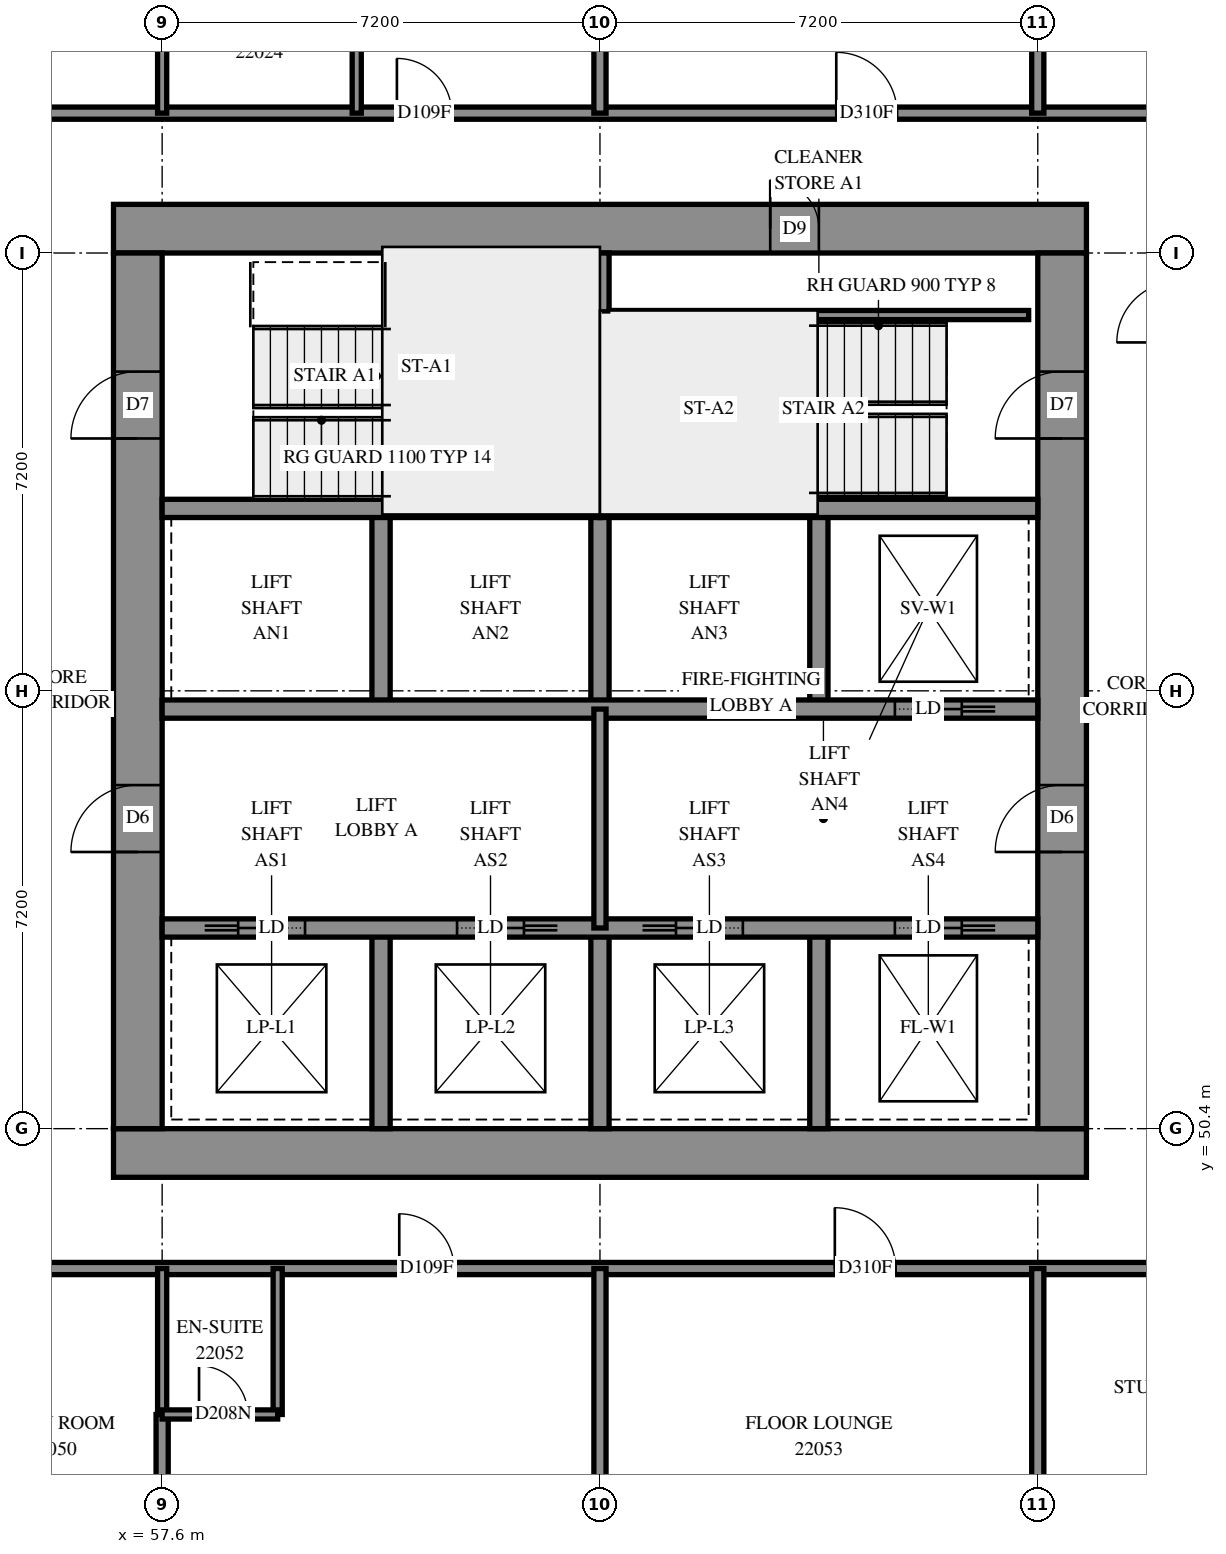
"""IFC4 building model, lengths in metres.
Left out: names, types, materials, properties, quantities, classifications, styles, units other than length and angle.
Written with IfcOpenShell. Run it as: python <this file> out.ifc"""

import sys

from ifc_helpers import new_model, si_unit, direction, frame, frame_2d, origin, place, context, subcontext, project, spatial, rectangle, extrude, element, fill, save


model = new_model("IFC4")
c1 = context("Model", 3, precision=1e-05, world=origin(), true_north=direction((0.0, 1.0)))
c2 = subcontext(c1, "Body", "Model", "MODEL_VIEW")
j1 = project(units=[si_unit("LENGTHUNIT", "METRE"), si_unit("PLANEANGLEUNIT", "RADIAN")], contexts=[c1])
p1 = place(None, origin())
s1 = spatial("IfcSite", under=j1, at=p1, CompositionType="ELEMENT")
p2 = place(p1, origin())
s2 = spatial("IfcBuilding", under=s1, at=p2, CompositionType="ELEMENT")
p3 = place(p2, frame((0.0, 0.0, 84.6)))
s3 = spatial("IfcBuildingStorey", under=s2, at=p3, CompositionType="ELEMENT", Elevation=84.6)
p4 = place(p3, frame((56.8, 50.0, -0.3), z_axis=(0.0, 0.0, 1.0), x_axis=(1.0, 0.0, 0.0)))
e1 = element("IfcWall", 1, at=p4, inside=s3, PredefinedType="SHEAR", context=c2, shape_type="SweptSolid", body=[
    extrude(rectangle(XDim=16.0, YDim=0.8, at=frame_2d((8.0, 0.0))), origin(), (0.0, 0.0, 1.0), 2.7),
])
p5 = place(p3, frame((56.8, 65.2, -0.3), z_axis=(0.0, 0.0, 1.0), x_axis=(1.0, 0.0, 0.0)))
e2 = element("IfcWall", 2, at=p5, inside=s3, PredefinedType="SHEAR", context=c2, shape_type="SweptSolid", body=[
    extrude(rectangle(XDim=16.0, YDim=0.8, at=frame_2d((8.0, 0.0))), origin(), (0.0, 0.0, 1.0), 2.7),
])
p6 = place(p5, frame((10.8, 0.0, 0.3)))
e3 = element("IfcOpeningElement", 3, at=p6, cuts=e2, PredefinedType="OPENING", context=c2, shape_type="SweptSolid", body=[
    extrude(rectangle(XDim=0.8, YDim=2.1, at=frame_2d((0.4, 1.05))), frame((0.0, 0.41, 0.0), z_axis=(0.0, -1.0, 0.0), x_axis=(1.0, 0.0, 0.0)), (0.0, 0.0, 1.0), 0.82),
])
p7 = place(p3, frame((57.2, 50.4, -0.3), z_axis=(0.0, 0.0, 1.0), x_axis=(0.0, 1.0, 0.0)))
e4 = element("IfcWall", 4, at=p7, inside=s3, PredefinedType="SHEAR", context=c2, shape_type="SweptSolid", body=[
    extrude(rectangle(XDim=14.4, YDim=0.8, at=frame_2d((7.2, 0.0))), origin(), (0.0, 0.0, 1.0), 2.7),
])
p8 = place(p7, frame((4.55, 0.0, 0.3)))
e5 = element("IfcOpeningElement", 5, at=p8, cuts=e4, PredefinedType="OPENING", context=c2, shape_type="SweptSolid", body=[
    extrude(rectangle(XDim=1.1, YDim=2.1, at=frame_2d((0.55, 1.05))), frame((0.0, 0.41, 0.0), z_axis=(0.0, -1.0, 0.0), x_axis=(1.0, 0.0, 0.0)), (0.0, 0.0, 1.0), 0.82),
])
p9 = place(p7, frame((11.35, 0.0, 0.3)))
e6 = element("IfcOpeningElement", 6, at=p9, cuts=e4, PredefinedType="OPENING", context=c2, shape_type="SweptSolid", body=[
    extrude(rectangle(XDim=1.1, YDim=2.1, at=frame_2d((0.55, 1.05))), frame((0.0, 0.41, 0.0), z_axis=(0.0, -1.0, 0.0), x_axis=(1.0, 0.0, 0.0)), (0.0, 0.0, 1.0), 0.82),
])
p10 = place(p3, frame((72.4, 50.4, -0.3), z_axis=(0.0, 0.0, 1.0), x_axis=(0.0, 1.0, 0.0)))
e7 = element("IfcWall", 7, at=p10, inside=s3, PredefinedType="SHEAR", context=c2, shape_type="SweptSolid", body=[
    extrude(rectangle(XDim=14.4, YDim=0.8, at=frame_2d((7.2, 0.0))), origin(), (0.0, 0.0, 1.0), 2.7),
])
p11 = place(p10, frame((4.55, 0.0, 0.3)))
e8 = element("IfcOpeningElement", 8, at=p11, cuts=e7, PredefinedType="OPENING", context=c2, shape_type="SweptSolid", body=[
    extrude(rectangle(XDim=1.1, YDim=2.1, at=frame_2d((0.55, 1.05))), frame((0.0, 0.41, 0.0), z_axis=(0.0, -1.0, 0.0), x_axis=(1.0, 0.0, 0.0)), (0.0, 0.0, 1.0), 0.82),
])
p12 = place(p10, frame((11.35, 0.0, 0.3)))
e9 = element("IfcOpeningElement", 9, at=p12, cuts=e7, PredefinedType="OPENING", context=c2, shape_type="SweptSolid", body=[
    extrude(rectangle(XDim=1.1, YDim=2.1, at=frame_2d((0.55, 1.05))), frame((0.0, 0.41, 0.0), z_axis=(0.0, -1.0, 0.0), x_axis=(1.0, 0.0, 0.0)), (0.0, 0.0, 1.0), 0.82),
])
for number, where, z_axis, x_axis in (
    (10, (61.2, 50.4, 0.0), (0.0, 0.0, 1.0), (0.0, 1.0, 0.0)),
    (11, (61.2, 57.3, 0.0), (0.0, 0.0, 1.0), (0.0, 1.0, 0.0)),
    (12, (64.8, 50.4, 0.0), (0.0, 0.0, 1.0), (0.0, 1.0, 0.0)),
    (13, (64.8, 57.3, 0.0), (0.0, 0.0, 1.0), (0.0, 1.0, 0.0)),
    (14, (68.4, 50.4, 0.0), (0.0, 0.0, 1.0), (0.0, 1.0, 0.0)),
    (15, (68.4, 57.3, 0.0), (0.0, 0.0, 1.0), (0.0, 1.0, 0.0)),
):
    element("IfcWall", number, at=place(p3, frame(where, z_axis=z_axis, x_axis=x_axis)), inside=s3, PredefinedType="SOLIDWALL", context=c2, shape_type="SweptSolid", body=[
        extrude(rectangle(XDim=3.3, YDim=0.3, at=frame_2d((1.65, 0.0))), origin(), (0.0, 0.0, 1.0), 3.1),
    ])
p13 = place(p3, frame((57.6, 53.7, 0.0), z_axis=(0.0, 0.0, 1.0), x_axis=(1.0, 0.0, 0.0)))
e16 = element("IfcWall", 16, at=p13, inside=s3, PredefinedType="SOLIDWALL", context=c2, shape_type="SweptSolid", body=[
    extrude(rectangle(XDim=14.4, YDim=0.3, at=frame_2d((7.2, 0.0))), origin(), (0.0, 0.0, 1.0), 3.1),
])
p14 = place(p13, frame((1.25, 0.0, 0.0)))
e17 = element("IfcOpeningElement", 17, at=p14, cuts=e16, PredefinedType="OPENING", context=c2, shape_type="SweptSolid", body=[
    extrude(rectangle(XDim=1.1, YDim=2.1, at=frame_2d((0.55, 1.05))), frame((0.0, 0.16, 0.0), z_axis=(0.0, -1.0, 0.0), x_axis=(1.0, 0.0, 0.0)), (0.0, 0.0, 1.0), 0.32),
])
p15 = place(p13, frame((4.85, 0.0, 0.0)))
e18 = element("IfcOpeningElement", 18, at=p15, cuts=e16, PredefinedType="OPENING", context=c2, shape_type="SweptSolid", body=[
    extrude(rectangle(XDim=1.1, YDim=2.1, at=frame_2d((0.55, 1.05))), frame((0.0, 0.16, 0.0), z_axis=(0.0, -1.0, 0.0), x_axis=(1.0, 0.0, 0.0)), (0.0, 0.0, 1.0), 0.32),
])
p16 = place(p13, frame((8.45, 0.0, 0.0)))
e19 = element("IfcOpeningElement", 19, at=p16, cuts=e16, PredefinedType="OPENING", context=c2, shape_type="SweptSolid", body=[
    extrude(rectangle(XDim=1.1, YDim=2.1, at=frame_2d((0.55, 1.05))), frame((0.0, 0.16, 0.0), z_axis=(0.0, -1.0, 0.0), x_axis=(1.0, 0.0, 0.0)), (0.0, 0.0, 1.0), 0.32),
])
p17 = place(p13, frame((12.05, 0.0, 0.0)))
e20 = element("IfcOpeningElement", 20, at=p17, cuts=e16, PredefinedType="OPENING", context=c2, shape_type="SweptSolid", body=[
    extrude(rectangle(XDim=1.1, YDim=2.1, at=frame_2d((0.55, 1.05))), frame((0.0, 0.16, 0.0), z_axis=(0.0, -1.0, 0.0), x_axis=(1.0, 0.0, 0.0)), (0.0, 0.0, 1.0), 0.32),
])
p18 = place(p3, frame((57.6, 57.3, 0.0), z_axis=(0.0, 0.0, 1.0), x_axis=(1.0, 0.0, 0.0)))
e21 = element("IfcWall", 21, at=p18, inside=s3, PredefinedType="SOLIDWALL", context=c2, shape_type="SweptSolid", body=[
    extrude(rectangle(XDim=14.4, YDim=0.3, at=frame_2d((7.2, 0.0))), origin(), (0.0, 0.0, 1.0), 3.1),
])
p19 = place(p18, frame((12.05, 0.0, 0.0)))
e22 = element("IfcOpeningElement", 22, at=p19, cuts=e21, PredefinedType="OPENING", context=c2, shape_type="SweptSolid", body=[
    extrude(rectangle(XDim=1.1, YDim=2.1, at=frame_2d((0.55, 1.05))), frame((0.0, 0.16, 0.0), z_axis=(0.0, -1.0, 0.0), x_axis=(1.0, 0.0, 0.0)), (0.0, 0.0, 1.0), 0.32),
])
for number, where, z_axis, x_axis in (
    (23, (57.6, 60.6, 0.0), (0.0, 0.0, 1.0), (1.0, 0.0, 0.0)),
    (24, (64.8, 60.6, 0.0), (0.0, 0.0, 1.0), (1.0, 0.0, 0.0)),
):
    element("IfcWall", number, at=place(p3, frame(where, z_axis=z_axis, x_axis=x_axis)), inside=s3, PredefinedType="SOLIDWALL", context=c2, shape_type="SweptSolid", body=[
        extrude(rectangle(XDim=7.2, YDim=0.3, at=frame_2d((3.6, 0.0))), origin(), (0.0, 0.0, 1.0), 3.1),
    ])
p20 = place(p3, frame((64.8, 60.6, 0.0), z_axis=(0.0, 0.0, 1.0), x_axis=(0.0, 1.0, 0.0)))
e25 = element("IfcWall", 25, at=p20, inside=s3, PredefinedType="SOLIDWALL", context=c2, shape_type="SweptSolid", body=[
    extrude(rectangle(XDim=4.2, YDim=0.3, at=frame_2d((2.1, 0.0))), origin(), (0.0, 0.0, 1.0), 3.1),
])
p21 = place(p3, frame((64.95, 63.78, 0.0), z_axis=(0.0, 0.0, 1.0), x_axis=(1.0, 0.0, 0.0)))
e26 = element("IfcWall", 26, at=p21, inside=s3, PredefinedType="PARTITIONING", context=c2, shape_type="SweptSolid", body=[
    extrude(rectangle(XDim=6.9, YDim=0.15, at=frame_2d((3.45, 0.0))), origin(), (0.0, 0.0, 1.0), 3.1),
])
p22 = place(p3, frame((64.8, 53.7, 0.0), z_axis=(0.0, 0.0, 1.0), x_axis=(0.0, 1.0, 0.0)))
e27 = element("IfcWall", 27, at=p22, inside=s3, PredefinedType="PARTITIONING", context=c2, shape_type="SweptSolid", body=[
    extrude(rectangle(XDim=3.6, YDim=0.2, at=frame_2d((1.8, 0.0))), origin(), (0.0, 0.0, 1.0), 3.1),
])
p23 = place(p3, frame((55.3, 48.1, 0.0), z_axis=(0.0, 0.0, 1.0), x_axis=(1.0, 0.0, 0.0)))
e28 = element("IfcWall", 28, at=p23, inside=s3, PredefinedType="PARTITIONING", context=c2, shape_type="SweptSolid", body=[
    extrude(rectangle(XDim=19.092, YDim=0.2, at=frame_2d((9.546, 0.0))), origin(), (0.0, 0.0, 1.0), 3.1),
])
p24 = place(p23, frame((6.199, 0.0, 0.0)))
e29 = element("IfcOpeningElement", 29, at=p24, cuts=e28, PredefinedType="OPENING", context=c2, shape_type="SweptSolid", body=[
    extrude(rectangle(XDim=0.9, YDim=2.1, at=frame_2d((0.45, 1.05))), frame((0.0, 0.11, 0.0), z_axis=(0.0, -1.0, 0.0), x_axis=(1.0, 0.0, 0.0)), (0.0, 0.0, 1.0), 0.22),
])
p25 = place(p23, frame((13.363, 0.0, 0.0)))
e30 = element("IfcOpeningElement", 30, at=p25, cuts=e28, PredefinedType="OPENING", context=c2, shape_type="SweptSolid", body=[
    extrude(rectangle(XDim=1.0, YDim=2.1, at=frame_2d((0.5, 1.05))), frame((0.0, 0.11, 0.0), z_axis=(0.0, -1.0, 0.0), x_axis=(1.0, 0.0, 0.0)), (0.0, 0.0, 1.0), 0.22),
])
p26 = place(p3, frame((55.3, 67.1, 0.0), z_axis=(0.0, 0.0, 1.0), x_axis=(1.0, 0.0, 0.0)))
e31 = element("IfcWall", 31, at=p26, inside=s3, PredefinedType="PARTITIONING", context=c2, shape_type="SweptSolid", body=[
    extrude(rectangle(XDim=19.0, YDim=0.2, at=frame_2d((9.5, 0.0))), origin(), (0.0, 0.0, 1.0), 3.1),
])
p27 = place(p26, frame((6.161, 0.0, 0.0)))
e32 = element("IfcOpeningElement", 32, at=p27, cuts=e31, PredefinedType="OPENING", context=c2, shape_type="SweptSolid", body=[
    extrude(rectangle(XDim=0.9, YDim=2.1, at=frame_2d((0.45, 1.05))), frame((0.0, 0.11, 0.0), z_axis=(0.0, -1.0, 0.0), x_axis=(1.0, 0.0, 0.0)), (0.0, 0.0, 1.0), 0.22),
])
p28 = place(p26, frame((13.386, 0.0, 0.0)))
e33 = element("IfcOpeningElement", 33, at=p28, cuts=e31, PredefinedType="OPENING", context=c2, shape_type="SweptSolid", body=[
    extrude(rectangle(XDim=1.0, YDim=2.1, at=frame_2d((0.5, 1.05))), frame((0.0, 0.11, 0.0), z_axis=(0.0, -1.0, 0.0), x_axis=(1.0, 0.0, 0.0)), (0.0, 0.0, 1.0), 0.22),
])
for number, where, z_axis, x_axis in (
    (34, (64.8, 67.1, 0.0), (0.0, 0.0, 1.0), (0.0, 1.0, 0.0)),
    (35, (72.0, 67.1, 0.0), (0.0, 0.0, 1.0), (0.0, 1.0, 0.0)),
    (36, (64.8, 43.7, 0.0), (0.0, 0.0, 1.0), (0.0, 1.0, 0.0)),
    (37, (72.0, 43.7, 0.0), (0.0, 0.0, 1.0), (0.0, 1.0, 0.0)),
):
    element("IfcWall", number, at=place(p3, frame(where, z_axis=z_axis, x_axis=x_axis)), inside=s3, PredefinedType="PARTITIONING", context=c2, shape_type="SweptSolid", body=[
        extrude(rectangle(XDim=4.4, YDim=0.2, at=frame_2d((2.2, 0.0))), origin(), (0.0, 0.0, 1.0), 3.1),
    ])
for number, where, z_axis, x_axis in (
    (38, (57.6, 67.1, 0.0), (0.0, 0.0, 1.0), (0.0, 1.0, 0.0)),
    (39, (60.8, 67.1, 0.0), (0.0, 0.0, 1.0), (0.0, 1.0, 0.0)),
    (40, (59.5, 45.7, 0.0), (0.0, 0.0, 1.0), (0.0, 1.0, 0.0)),
    (41, (57.6, 45.7, 0.0), (0.0, 0.0, 1.0), (0.0, 1.0, 0.0)),
):
    element("IfcWall", number, at=place(p3, frame(where, z_axis=z_axis, x_axis=x_axis)), inside=s3, PredefinedType="PARTITIONING", context=c2, shape_type="SweptSolid", body=[
        extrude(rectangle(XDim=2.4, YDim=0.15, at=frame_2d((1.2, 0.0))), origin(), (0.0, 0.0, 1.0), 3.1),
    ])
p29 = place(p3, frame((57.6, 43.7, 0.0), z_axis=(0.0, 0.0, 1.0), x_axis=(0.0, 1.0, 0.0)))
e42 = element("IfcWall", 42, at=p29, inside=s3, PredefinedType="PARTITIONING", context=c2, shape_type="SweptSolid", body=[
    extrude(rectangle(XDim=2.0, YDim=0.2, at=frame_2d((1.0, 0.0))), origin(), (0.0, 0.0, 1.0), 3.1),
])
p30 = place(p3, frame((57.6, 45.7, 0.0), z_axis=(0.0, 0.0, 1.0), x_axis=(1.0, 0.0, 0.0)))
e43 = element("IfcWall", 43, at=p30, inside=s3, PredefinedType="PARTITIONING", context=c2, shape_type="SweptSolid", body=[
    extrude(rectangle(XDim=1.9, YDim=0.15, at=frame_2d((0.95, 0.0))), origin(), (0.0, 0.0, 1.0), 3.1),
])
p31 = place(p30, frame((0.607, 0.0, 0.0)))
e44 = element("IfcOpeningElement", 44, at=p31, cuts=e43, PredefinedType="OPENING", context=c2, shape_type="SweptSolid", body=[
    extrude(rectangle(XDim=0.8, YDim=2.1, at=frame_2d((0.4, 1.05))), frame((0.0, 0.085, 0.0), z_axis=(0.0, -1.0, 0.0), x_axis=(1.0, 0.0, 0.0)), (0.0, 0.0, 1.0), 0.17),
])
p32 = place(p6, origin())
e45 = element("IfcDoor", 45, at=p32, inside=s3, OperationType="SINGLE_SWING_RIGHT", PredefinedType="DOOR", context=c2, shape_type="SweptSolid", body=[
    extrude(rectangle(XDim=0.8, YDim=2.1, at=frame_2d((0.4, 1.05))), frame((0.0, -0.34, 0.0), z_axis=(0.0, -1.0, 0.0), x_axis=(1.0, 0.0, 0.0)), (0.0, 0.0, 1.0), 0.05),
])
fill(e3, e45)
p33 = place(p8, origin())
e46 = element("IfcDoor", 46, at=p33, inside=s3, OperationType="DOUBLE_DOOR_SINGLE_SWING", PredefinedType="DOOR", context=c2, shape_type="SweptSolid", body=[
    extrude(rectangle(XDim=1.1, YDim=2.1, at=frame_2d((0.55, 1.05))), frame((0.0, 0.025, 0.0), z_axis=(0.0, -1.0, 0.0), x_axis=(1.0, 0.0, 0.0)), (0.0, 0.0, 1.0), 0.05),
])
fill(e5, e46)
p34 = place(p11, origin())
e47 = element("IfcDoor", 47, at=p34, inside=s3, OperationType="DOUBLE_DOOR_SINGLE_SWING", PredefinedType="DOOR", context=c2, shape_type="SweptSolid", body=[
    extrude(rectangle(XDim=1.1, YDim=2.1, at=frame_2d((0.55, 1.05))), frame((0.0, 0.025, 0.0), z_axis=(0.0, -1.0, 0.0), x_axis=(1.0, 0.0, 0.0)), (0.0, 0.0, 1.0), 0.05),
])
fill(e8, e47)
p35 = place(p9, origin())
e48 = element("IfcDoor", 48, at=p35, inside=s3, OperationType="SINGLE_SWING_LEFT", PredefinedType="DOOR", context=c2, shape_type="SweptSolid", body=[
    extrude(rectangle(XDim=1.1, YDim=2.1, at=frame_2d((0.55, 1.05))), frame((0.0, 0.025, 0.0), z_axis=(0.0, -1.0, 0.0), x_axis=(1.0, 0.0, 0.0)), (0.0, 0.0, 1.0), 0.05),
])
fill(e6, e48)
p36 = place(p12, origin())
e49 = element("IfcDoor", 49, at=p36, inside=s3, OperationType="SINGLE_SWING_RIGHT", PredefinedType="DOOR", context=c2, shape_type="SweptSolid", body=[
    extrude(rectangle(XDim=1.1, YDim=2.1, at=frame_2d((0.55, 1.05))), frame((0.0, 0.025, 0.0), z_axis=(0.0, -1.0, 0.0), x_axis=(1.0, 0.0, 0.0)), (0.0, 0.0, 1.0), 0.05),
])
fill(e9, e49)
p37 = place(p14, origin())
e50 = element("IfcDoor", 50, at=p37, inside=s3, OperationType="SLIDING_TO_LEFT", PredefinedType="DOOR", context=c2, shape_type="SweptSolid", body=[
    extrude(rectangle(XDim=1.1, YDim=2.1, at=frame_2d((0.55, 1.05))), frame((0.0, 0.025, 0.0), z_axis=(0.0, -1.0, 0.0), x_axis=(1.0, 0.0, 0.0)), (0.0, 0.0, 1.0), 0.05),
])
fill(e17, e50)
p38 = place(p15, origin())
e51 = element("IfcDoor", 51, at=p38, inside=s3, OperationType="SLIDING_TO_RIGHT", PredefinedType="DOOR", context=c2, shape_type="SweptSolid", body=[
    extrude(rectangle(XDim=1.1, YDim=2.1, at=frame_2d((0.55, 1.05))), frame((0.0, 0.025, 0.0), z_axis=(0.0, -1.0, 0.0), x_axis=(1.0, 0.0, 0.0)), (0.0, 0.0, 1.0), 0.05),
])
fill(e18, e51)
p39 = place(p16, origin())
e52 = element("IfcDoor", 52, at=p39, inside=s3, OperationType="SLIDING_TO_LEFT", PredefinedType="DOOR", context=c2, shape_type="SweptSolid", body=[
    extrude(rectangle(XDim=1.1, YDim=2.1, at=frame_2d((0.55, 1.05))), frame((0.0, 0.025, 0.0), z_axis=(0.0, -1.0, 0.0), x_axis=(1.0, 0.0, 0.0)), (0.0, 0.0, 1.0), 0.05),
])
fill(e19, e52)
p40 = place(p17, origin())
e53 = element("IfcDoor", 53, at=p40, inside=s3, OperationType="SLIDING_TO_RIGHT", PredefinedType="DOOR", context=c2, shape_type="SweptSolid", body=[
    extrude(rectangle(XDim=1.1, YDim=2.1, at=frame_2d((0.55, 1.05))), frame((0.0, 0.025, 0.0), z_axis=(0.0, -1.0, 0.0), x_axis=(1.0, 0.0, 0.0)), (0.0, 0.0, 1.0), 0.05),
])
fill(e20, e53)
p41 = place(p19, origin())
e54 = element("IfcDoor", 54, at=p41, inside=s3, OperationType="SLIDING_TO_RIGHT", PredefinedType="DOOR", context=c2, shape_type="SweptSolid", body=[
    extrude(rectangle(XDim=1.1, YDim=2.1, at=frame_2d((0.55, 1.05))), frame((0.0, 0.025, 0.0), z_axis=(0.0, -1.0, 0.0), x_axis=(1.0, 0.0, 0.0)), (0.0, 0.0, 1.0), 0.05),
])
fill(e22, e54)
p42 = place(p27, origin())
e55 = element("IfcDoor", 55, at=p42, inside=s3, OperationType="SINGLE_SWING_RIGHT", PredefinedType="DOOR", context=c2, shape_type="SweptSolid", body=[
    extrude(rectangle(XDim=0.9, YDim=2.1, at=frame_2d((0.45, 1.05))), frame((0.0, 0.025, 0.0), z_axis=(0.0, -1.0, 0.0), x_axis=(1.0, 0.0, 0.0)), (0.0, 0.0, 1.0), 0.05),
])
fill(e32, e55)
p43 = place(p28, origin())
e56 = element("IfcDoor", 56, at=p43, inside=s3, OperationType="SINGLE_SWING_RIGHT", PredefinedType="DOOR", context=c2, shape_type="SweptSolid", body=[
    extrude(rectangle(XDim=1.0, YDim=2.1, at=frame_2d((0.5, 1.05))), frame((0.0, 0.025, 0.0), z_axis=(0.0, -1.0, 0.0), x_axis=(1.0, 0.0, 0.0)), (0.0, 0.0, 1.0), 0.05),
])
fill(e33, e56)
p44 = place(p24, origin())
e57 = element("IfcDoor", 57, at=p44, inside=s3, OperationType="SINGLE_SWING_LEFT", PredefinedType="DOOR", context=c2, shape_type="SweptSolid", body=[
    extrude(rectangle(XDim=0.9, YDim=2.1, at=frame_2d((0.45, 1.05))), frame((0.0, 0.025, 0.0), z_axis=(0.0, -1.0, 0.0), x_axis=(1.0, 0.0, 0.0)), (0.0, 0.0, 1.0), 0.05),
])
fill(e29, e57)
p45 = place(p31, origin())
e58 = element("IfcDoor", 58, at=p45, inside=s3, OperationType="SINGLE_SWING_RIGHT", PredefinedType="DOOR", context=c2, shape_type="SweptSolid", body=[
    extrude(rectangle(XDim=0.8, YDim=2.1, at=frame_2d((0.4, 1.05))), frame((0.0, 0.025, 0.0), z_axis=(0.0, -1.0, 0.0), x_axis=(1.0, 0.0, 0.0)), (0.0, 0.0, 1.0), 0.05),
])
fill(e44, e58)
p46 = place(p25, origin())
e59 = element("IfcDoor", 59, at=p46, inside=s3, OperationType="SINGLE_SWING_LEFT", PredefinedType="DOOR", context=c2, shape_type="SweptSolid", body=[
    extrude(rectangle(XDim=1.0, YDim=2.1, at=frame_2d((0.5, 1.05))), frame((0.0, 0.025, 0.0), z_axis=(0.0, -1.0, 0.0), x_axis=(1.0, 0.0, 0.0)), (0.0, 0.0, 1.0), 0.05),
])
fill(e30, e59)
save(model, sys.argv[1])
